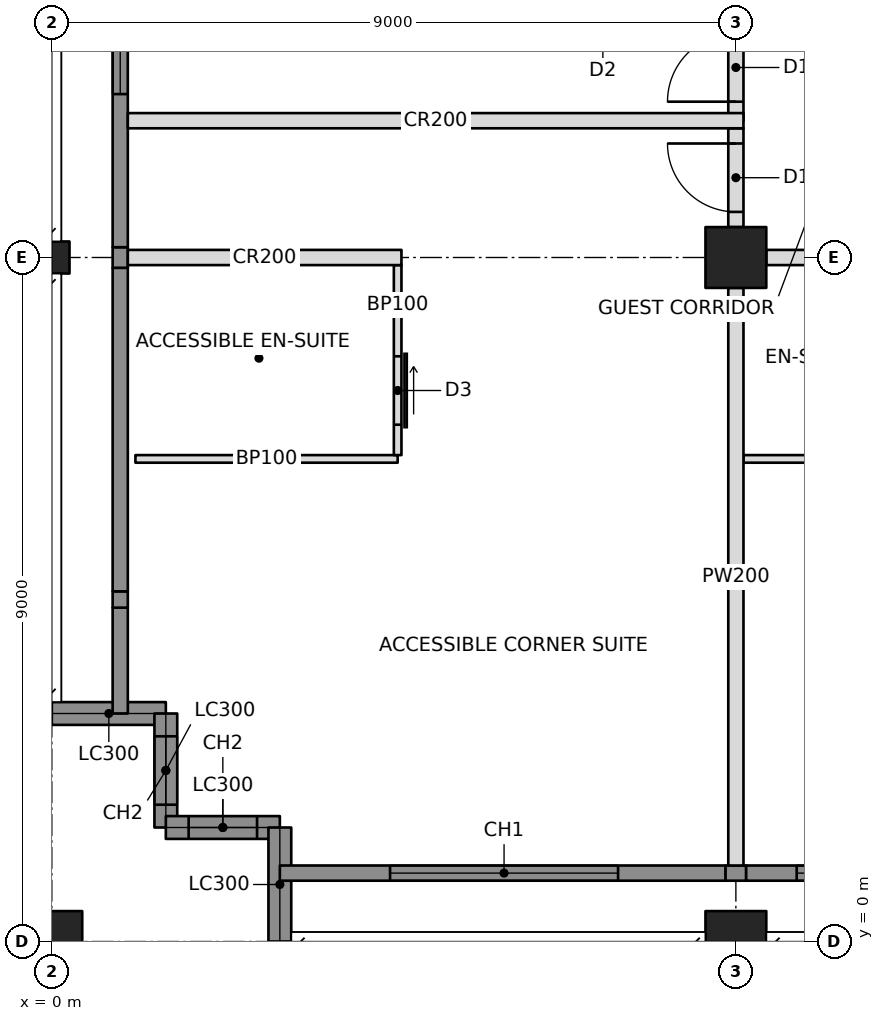
"""IFC4 building model, lengths in metres.
Left out: names, types, materials, properties, quantities, classifications, styles, units other than length and angle.
Written with IfcOpenShell. Run it as: python <this file> out.ifc"""

import sys

from ifc_helpers import new_model, si_unit, direction, frame, frame_2d, origin, origin_with_axes, origin_2d, place, context, subcontext, project, spatial, rectangle, hollow_rectangle, i_section, extrude, element, fill, save


model = new_model("IFC4")
c1 = context("Model", 3, precision=1e-05, world=origin(), true_north=direction((0.0, 1.0)))
c2 = subcontext(c1, "Body", "Model", "MODEL_VIEW")
j1 = project(units=[si_unit("LENGTHUNIT", "METRE"), si_unit("PLANEANGLEUNIT", "RADIAN")], contexts=[c1])
p1 = place(None, origin())
s1 = spatial("IfcSite", under=j1, at=p1, CompositionType="ELEMENT")
p2 = place(p1, origin())
s2 = spatial("IfcBuilding", under=s1, at=p2, CompositionType="ELEMENT")
p3 = place(p2, frame((0.0, 0.0, 230.2)))
s3 = spatial("IfcBuildingStorey", under=s2, at=p3, CompositionType="ELEMENT", Elevation=230.2)
p4 = place(p3, origin_with_axes())
e1 = element("IfcColumn", 1, at=p4, inside=s3, PredefinedType="COLUMN", context=c2, shape_type="SweptSolid", body=[
    extrude(hollow_rectangle(XDim=0.8, YDim=0.8, WallThickness=0.05, at=origin_2d()), origin(), (0.0, 0.0, 1.0), 3.6),
])
p5 = place(p3, frame((0.0, 9.0, 0.0), z_axis=(0.0, 0.0, 1.0), x_axis=(0.0, 1.0, 0.0)))
e2 = element("IfcColumn", 2, at=p5, inside=s3, PredefinedType="COLUMN", context=c2, shape_type="SweptSolid", body=[
    extrude(i_section(OverallWidth=0.422, OverallDepth=0.465, WebThickness=0.045, FlangeThickness=0.073, at=origin_2d()), origin(), (0.0, 0.0, 1.0), 3.6),
])
p6 = place(p3, frame((9.0, 0.0, 0.0), z_axis=(0.0, 0.0, 1.0), x_axis=(1.0, 0.0, 0.0)))
e3 = element("IfcColumn", 3, at=p6, inside=s3, PredefinedType="COLUMN", context=c2, shape_type="SweptSolid", body=[
    extrude(hollow_rectangle(XDim=0.8, YDim=0.8, WallThickness=0.05, at=origin_2d()), origin(), (0.0, 0.0, 1.0), 3.6),
])
p7 = place(p3, frame((9.0, 9.0, 0.0), z_axis=(0.0, 0.0, 1.0), x_axis=(1.0, 0.0, 0.0)))
e4 = element("IfcColumn", 4, at=p7, inside=s3, PredefinedType="COLUMN", context=c2, shape_type="SweptSolid", body=[
    extrude(hollow_rectangle(XDim=0.8, YDim=0.8, WallThickness=0.1, at=origin_2d()), origin(), (0.0, 0.0, 1.0), 3.6),
])
p8 = place(p3, frame((0.0, 3.0, 0.0), z_axis=(0.0, 0.0, 1.0), x_axis=(1.0, 0.0, 0.0)))
e5 = element("IfcWall", 5, at=p8, inside=s3, PredefinedType="SOLIDWALL", context=c2, shape_type="SweptSolid", body=[
    extrude(rectangle(XDim=1.5, YDim=0.3, at=frame_2d((0.75, 0.0))), origin(), (0.0, 0.0, 1.0), 2.62),
])
p9 = place(p3, frame((1.5, 3.0, 0.0), z_axis=(0.0, 0.0, 1.0), x_axis=(0.0, -1.0, 0.0)))
e6 = element("IfcWall", 6, at=p9, inside=s3, PredefinedType="SOLIDWALL", context=c2, shape_type="SweptSolid", body=[
    extrude(rectangle(XDim=1.5, YDim=0.3, at=frame_2d((0.75, 0.0))), origin(), (0.0, 0.0, 1.0), 3.4),
])
p10 = place(p9, frame((0.3, 0.0, 0.6)))
e7 = element("IfcOpeningElement", 7, at=p10, cuts=e6, PredefinedType="OPENING", context=c2, shape_type="SweptSolid", body=[
    extrude(rectangle(XDim=0.9, YDim=2.2, at=frame_2d((0.45, 1.1))), frame((0.0, 0.16, 0.0), z_axis=(0.0, -1.0, 0.0), x_axis=(1.0, 0.0, 0.0)), (0.0, 0.0, 1.0), 0.32),
])
p11 = place(p3, frame((1.5, 1.5, 0.0), z_axis=(0.0, 0.0, 1.0), x_axis=(1.0, 0.0, 0.0)))
e8 = element("IfcWall", 8, at=p11, inside=s3, PredefinedType="SOLIDWALL", context=c2, shape_type="SweptSolid", body=[
    extrude(rectangle(XDim=1.5, YDim=0.3, at=frame_2d((0.75, 0.0))), origin(), (0.0, 0.0, 1.0), 3.4),
])
p12 = place(p11, frame((0.3, 0.0, 0.6)))
e9 = element("IfcOpeningElement", 9, at=p12, cuts=e8, PredefinedType="OPENING", context=c2, shape_type="SweptSolid", body=[
    extrude(rectangle(XDim=0.9, YDim=2.2, at=frame_2d((0.45, 1.1))), frame((0.0, 0.16, 0.0), z_axis=(0.0, -1.0, 0.0), x_axis=(1.0, 0.0, 0.0)), (0.0, 0.0, 1.0), 0.32),
])
p13 = place(p3, frame((3.0, 1.5, 0.0), z_axis=(0.0, 0.0, 1.0), x_axis=(0.0, -1.0, 0.0)))
e10 = element("IfcWall", 10, at=p13, inside=s3, PredefinedType="SOLIDWALL", context=c2, shape_type="SweptSolid", body=[
    extrude(rectangle(XDim=1.5, YDim=0.3, at=frame_2d((0.75, 0.0))), origin(), (0.0, 0.0, 1.0), 2.62),
])
p14 = place(p3, frame((3.0, 0.9, 0.0), z_axis=(0.0, 0.0, 1.0), x_axis=(1.0, 0.0, 0.0)))
e11 = element("IfcWall", 11, at=p14, inside=s3, PredefinedType="SOLIDWALL", context=c2, shape_type="SweptSolid", body=[
    extrude(rectangle(XDim=5.865, YDim=0.2, at=frame_2d((2.932, 0.0))), origin(), (0.0, 0.0, 1.0), 3.4),
])
p15 = place(p14, frame((1.45, 0.0, 0.6)))
e12 = element("IfcOpeningElement", 12, at=p15, cuts=e11, PredefinedType="OPENING", context=c2, shape_type="SweptSolid", body=[
    extrude(rectangle(XDim=3.0, YDim=2.2, at=frame_2d((1.5, 1.1))), frame((0.0, 0.11, 0.0), z_axis=(0.0, -1.0, 0.0), x_axis=(1.0, 0.0, 0.0)), (0.0, 0.0, 1.0), 0.22),
])
p16 = place(p3, frame((0.9, 3.0, 0.0), z_axis=(0.0, 0.0, 1.0), x_axis=(0.0, 1.0, 0.0)))
e13 = element("IfcWall", 13, at=p16, inside=s3, PredefinedType="SOLIDWALL", context=c2, shape_type="SweptSolid", body=[
    extrude(rectangle(XDim=1.393, YDim=0.2, at=frame_2d((0.696, 0.0))), origin(), (0.0, 0.0, 1.0), 3.4),
])
p17 = place(p3, frame((1.0, 9.0, 0.0), z_axis=(0.0, 0.0, 1.0), x_axis=(1.0, 0.0, 0.0)))
e14 = element("IfcWall", 14, at=p17, inside=s3, PredefinedType="PARTITIONING", context=c2, shape_type="SweptSolid", body=[
    extrude(rectangle(XDim=3.6, YDim=0.2, at=frame_2d((1.8, 0.0))), origin(), (0.0, 0.0, 1.0), 2.638),
])
p18 = place(p3, frame((9.4, 9.0, 0.0), z_axis=(0.0, 0.0, 1.0), x_axis=(1.0, 0.0, 0.0)))
e15 = element("IfcWall", 15, at=p18, inside=s3, PredefinedType="PARTITIONING", context=c2, shape_type="SweptSolid", body=[
    extrude(rectangle(XDim=8.2, YDim=0.2, at=frame_2d((4.1, 0.0))), origin(), (0.0, 0.0, 1.0), 2.605),
])
p19 = place(p18, frame((2.95, 0.0, 0.0)))
e16 = element("IfcOpeningElement", 16, at=p19, cuts=e15, PredefinedType="OPENING", context=c2, shape_type="SweptSolid", body=[
    extrude(rectangle(XDim=0.9, YDim=2.1, at=frame_2d((0.45, 1.05))), frame((0.0, 0.11, 0.0), z_axis=(0.0, -1.0, 0.0), x_axis=(1.0, 0.0, 0.0)), (0.0, 0.0, 1.0), 0.22),
])
p20 = place(p18, frame((4.35, 0.0, 0.0)))
e17 = element("IfcOpeningElement", 17, at=p20, cuts=e15, PredefinedType="OPENING", context=c2, shape_type="SweptSolid", body=[
    extrude(rectangle(XDim=0.9, YDim=2.1, at=frame_2d((0.45, 1.05))), frame((0.0, 0.11, 0.0), z_axis=(0.0, -1.0, 0.0), x_axis=(1.0, 0.0, 0.0)), (0.0, 0.0, 1.0), 0.22),
])
p21 = place(p3, frame((9.0, 10.8, 0.0), z_axis=(0.0, 0.0, 1.0), x_axis=(0.0, 1.0, 0.0)))
e18 = element("IfcWall", 18, at=p21, inside=s3, PredefinedType="PARTITIONING", context=c2, shape_type="SweptSolid", body=[
    extrude(rectangle(XDim=6.8, YDim=0.2, at=frame_2d((3.4, 0.0))), origin(), (0.0, 0.0, 1.0), 2.605),
])
p22 = place(p21, frame((0.25, 0.0, 0.0)))
e19 = element("IfcOpeningElement", 19, at=p22, cuts=e18, PredefinedType="OPENING", context=c2, shape_type="SweptSolid", body=[
    extrude(rectangle(XDim=0.9, YDim=2.1, at=frame_2d((0.45, 1.05))), frame((0.0, 0.11, 0.0), z_axis=(0.0, -1.0, 0.0), x_axis=(1.0, 0.0, 0.0)), (0.0, 0.0, 1.0), 0.22),
])
p23 = place(p21, frame((3.85, 0.0, 0.0)))
e20 = element("IfcOpeningElement", 20, at=p23, cuts=e18, PredefinedType="OPENING", context=c2, shape_type="SweptSolid", body=[
    extrude(rectangle(XDim=0.9, YDim=2.1, at=frame_2d((0.45, 1.05))), frame((0.0, 0.11, 0.0), z_axis=(0.0, -1.0, 0.0), x_axis=(1.0, 0.0, 0.0)), (0.0, 0.0, 1.0), 0.22),
])
p24 = place(p3, frame((1.0, 10.8, 0.0), z_axis=(0.0, 0.0, 1.0), x_axis=(1.0, 0.0, 0.0)))
e21 = element("IfcWall", 21, at=p24, inside=s3, PredefinedType="PARTITIONING", context=c2, shape_type="SweptSolid", body=[
    extrude(rectangle(XDim=8.1, YDim=0.2, at=frame_2d((4.05, 0.0))), origin(), (0.0, 0.0, 1.0), 2.604),
])
p25 = place(p3, frame((9.0, 8.6, 0.0), z_axis=(0.0, 0.0, 1.0), x_axis=(0.0, -1.0, 0.0)))
e22 = element("IfcWall", 22, at=p25, inside=s3, PredefinedType="PARTITIONING", context=c2, shape_type="SweptSolid", body=[
    extrude(rectangle(XDim=7.6, YDim=0.2, at=frame_2d((3.8, 0.0))), origin(), (0.0, 0.0, 1.0), 2.638),
])
p26 = place(p3, frame((1.1, 6.35, 0.0), z_axis=(0.0, 0.0, 1.0), x_axis=(1.0, 0.0, 0.0)))
e23 = element("IfcWall", 23, at=p26, inside=s3, PredefinedType="PARTITIONING", context=c2, shape_type="SweptSolid", body=[
    extrude(rectangle(XDim=3.45, YDim=0.1, at=frame_2d((1.725, 0.0))), origin(), (0.0, 0.0, 1.0), 3.4),
])
p27 = place(p3, frame((4.55, 8.9, 0.0), z_axis=(0.0, 0.0, 1.0), x_axis=(0.0, -1.0, 0.0)))
e24 = element("IfcWall", 24, at=p27, inside=s3, PredefinedType="PARTITIONING", context=c2, shape_type="SweptSolid", body=[
    extrude(rectangle(XDim=2.5, YDim=0.1, at=frame_2d((1.25, 0.0))), origin(), (0.0, 0.0, 1.0), 2.638),
])
p28 = place(p27, frame((1.2, 0.0, 0.0)))
e25 = element("IfcOpeningElement", 25, at=p28, cuts=e24, PredefinedType="OPENING", context=c2, shape_type="SweptSolid", body=[
    extrude(rectangle(XDim=0.9, YDim=2.1, at=frame_2d((0.45, 1.05))), frame((0.0, 0.06, 0.0), z_axis=(0.0, -1.0, 0.0), x_axis=(1.0, 0.0, 0.0)), (0.0, 0.0, 1.0), 0.12),
])
p29 = place(p3, frame((9.1, 6.35, 0.0), z_axis=(0.0, 0.0, 1.0), x_axis=(1.0, 0.0, 0.0)))
e26 = element("IfcWall", 26, at=p29, inside=s3, PredefinedType="PARTITIONING", context=c2, shape_type="SweptSolid", body=[
    extrude(rectangle(XDim=2.95, YDim=0.1, at=frame_2d((1.475, 0.0))), origin(), (0.0, 0.0, 1.0), 2.638),
])
p30 = place(p3, frame((9.0, 9.4, 0.0), z_axis=(0.0, 0.0, 1.0), x_axis=(0.0, 1.0, 0.0)))
e27 = element("IfcWall", 27, at=p30, inside=s3, PredefinedType="PARTITIONING", context=c2, shape_type="SweptSolid", body=[
    extrude(rectangle(XDim=1.3, YDim=0.2, at=frame_2d((0.65, 0.0))), origin(), (0.0, 0.0, 1.0), 2.605),
])
p31 = place(p30, frame((0.2, 0.0, 0.0)))
e28 = element("IfcOpeningElement", 28, at=p31, cuts=e27, PredefinedType="OPENING", context=c2, shape_type="SweptSolid", body=[
    extrude(rectangle(XDim=0.9, YDim=2.1, at=frame_2d((0.45, 1.05))), frame((0.0, 0.11, 0.0), z_axis=(0.0, -1.0, 0.0), x_axis=(1.0, 0.0, 0.0)), (0.0, 0.0, 1.0), 0.22),
])
p32 = place(p3, frame((8.865, 0.9, 0.0), z_axis=(0.0, 0.0, 1.0), x_axis=(1.0, 0.0, 0.0)))
e29 = element("IfcWall", 29, at=p32, inside=s3, PredefinedType="SOLIDWALL", context=c2, shape_type="SweptSolid", body=[
    extrude(rectangle(XDim=0.271, YDim=0.2, at=frame_2d((0.135, 0.0))), origin(), (0.0, 0.0, 1.0), 2.638),
])
p33 = place(p3, frame((9.135, 0.9, 0.0), z_axis=(0.0, 0.0, 1.0), x_axis=(1.0, 0.0, 0.0)))
e30 = element("IfcWall", 30, at=p33, inside=s3, PredefinedType="SOLIDWALL", context=c2, shape_type="SweptSolid", body=[
    extrude(rectangle(XDim=8.671, YDim=0.2, at=frame_2d((4.335, 0.0))), origin(), (0.0, 0.0, 1.0), 3.4),
])
p34 = place(p33, frame((0.665, 0.0, 0.6)))
e31 = element("IfcOpeningElement", 31, at=p34, cuts=e30, PredefinedType="OPENING", context=c2, shape_type="SweptSolid", body=[
    extrude(rectangle(XDim=3.0, YDim=2.2, at=frame_2d((1.5, 1.1))), frame((0.0, 0.11, 0.0), z_axis=(0.0, -1.0, 0.0), x_axis=(1.0, 0.0, 0.0)), (0.0, 0.0, 1.0), 0.22),
])
p35 = place(p33, frame((5.065, 0.0, 0.6)))
e32 = element("IfcOpeningElement", 32, at=p35, cuts=e30, PredefinedType="OPENING", context=c2, shape_type="SweptSolid", body=[
    extrude(rectangle(XDim=3.0, YDim=2.2, at=frame_2d((1.5, 1.1))), frame((0.0, 0.11, 0.0), z_axis=(0.0, -1.0, 0.0), x_axis=(1.0, 0.0, 0.0)), (0.0, 0.0, 1.0), 0.22),
])
p36 = place(p3, frame((0.9, 4.393, 0.0), z_axis=(0.0, 0.0, 1.0), x_axis=(0.0, 1.0, 0.0)))
e33 = element("IfcWall", 33, at=p36, inside=s3, PredefinedType="SOLIDWALL", context=c2, shape_type="SweptSolid", body=[
    extrude(rectangle(XDim=0.215, YDim=0.2, at=frame_2d((0.107, 0.0))), origin(), (0.0, 0.0, 1.0), 2.861),
])
p37 = place(p3, frame((0.9, 4.607, 0.0), z_axis=(0.0, 0.0, 1.0), x_axis=(0.0, 1.0, 0.0)))
e34 = element("IfcWall", 34, at=p37, inside=s3, PredefinedType="SOLIDWALL", context=c2, shape_type="SweptSolid", body=[
    extrude(rectangle(XDim=4.257, YDim=0.2, at=frame_2d((2.129, 0.0))), origin(), (0.0, 0.0, 1.0), 3.4),
])
p38 = place(p3, frame((0.9, 8.865, 0.0), z_axis=(0.0, 0.0, 1.0), x_axis=(0.0, 1.0, 0.0)))
e35 = element("IfcWall", 35, at=p38, inside=s3, PredefinedType="SOLIDWALL", context=c2, shape_type="SweptSolid", body=[
    extrude(rectangle(XDim=0.271, YDim=0.2, at=frame_2d((0.135, 0.0))), origin(), (0.0, 0.0, 1.0), 2.638),
])
p39 = place(p3, frame((0.9, 9.135, 0.0), z_axis=(0.0, 0.0, 1.0), x_axis=(0.0, 1.0, 0.0)))
e36 = element("IfcWall", 36, at=p39, inside=s3, PredefinedType="SOLIDWALL", context=c2, shape_type="SweptSolid", body=[
    extrude(rectangle(XDim=8.671, YDim=0.2, at=frame_2d((4.335, 0.0))), origin(), (0.0, 0.0, 1.0), 3.4),
])
p40 = place(p39, frame((2.015, 0.0, 0.6)))
e37 = element("IfcOpeningElement", 37, at=p40, cuts=e36, PredefinedType="OPENING", context=c2, shape_type="SweptSolid", body=[
    extrude(rectangle(XDim=3.0, YDim=2.2, at=frame_2d((1.5, 1.1))), frame((0.0, 0.11, 0.0), z_axis=(0.0, -1.0, 0.0), x_axis=(1.0, 0.0, 0.0)), (0.0, 0.0, 1.0), 0.22),
])
p41 = place(p39, frame((5.515, 0.0, 0.6)))
e38 = element("IfcOpeningElement", 38, at=p41, cuts=e36, PredefinedType="OPENING", context=c2, shape_type="SweptSolid", body=[
    extrude(rectangle(XDim=3.0, YDim=2.2, at=frame_2d((1.5, 1.1))), frame((0.0, 0.11, 0.0), z_axis=(0.0, -1.0, 0.0), x_axis=(1.0, 0.0, 0.0)), (0.0, 0.0, 1.0), 0.22),
])
p42 = place(p10, origin())
e39 = element("IfcWindow", 39, at=p42, inside=s3, PartitioningType="SINGLE_PANEL", PredefinedType="WINDOW", context=c2, shape_type="SweptSolid", body=[
    extrude(rectangle(XDim=0.9, YDim=2.2, at=frame_2d((0.45, 1.1))), frame((0.0, 0.03, 0.0), z_axis=(0.0, -1.0, 0.0), x_axis=(1.0, 0.0, 0.0)), (0.0, 0.0, 1.0), 0.06),
])
fill(e7, e39)
p43 = place(p12, origin())
e40 = element("IfcWindow", 40, at=p43, inside=s3, PartitioningType="SINGLE_PANEL", PredefinedType="WINDOW", context=c2, shape_type="SweptSolid", body=[
    extrude(rectangle(XDim=0.9, YDim=2.2, at=frame_2d((0.45, 1.1))), frame((0.0, 0.03, 0.0), z_axis=(0.0, -1.0, 0.0), x_axis=(1.0, 0.0, 0.0)), (0.0, 0.0, 1.0), 0.06),
])
fill(e9, e40)
p44 = place(p15, origin())
e41 = element("IfcWindow", 41, at=p44, inside=s3, PartitioningType="TRIPLE_PANEL_VERTICAL", PredefinedType="WINDOW", context=c2, shape_type="SweptSolid", body=[
    extrude(rectangle(XDim=3.0, YDim=2.2, at=frame_2d((1.5, 1.1))), frame((0.0, 0.03, 0.0), z_axis=(0.0, -1.0, 0.0), x_axis=(1.0, 0.0, 0.0)), (0.0, 0.0, 1.0), 0.06),
])
fill(e12, e41)
p45 = place(p34, origin())
e42 = element("IfcWindow", 42, at=p45, inside=s3, PartitioningType="TRIPLE_PANEL_VERTICAL", PredefinedType="WINDOW", context=c2, shape_type="SweptSolid", body=[
    extrude(rectangle(XDim=3.0, YDim=2.2, at=frame_2d((1.5, 1.1))), frame((0.0, 0.03, 0.0), z_axis=(0.0, -1.0, 0.0), x_axis=(1.0, 0.0, 0.0)), (0.0, 0.0, 1.0), 0.06),
])
fill(e31, e42)
p46 = place(p40, origin())
e43 = element("IfcWindow", 43, at=p46, inside=s3, PartitioningType="TRIPLE_PANEL_VERTICAL", PredefinedType="WINDOW", context=c2, shape_type="SweptSolid", body=[
    extrude(rectangle(XDim=3.0, YDim=2.2, at=frame_2d((1.5, 1.1))), frame((0.0, 0.03, 0.0), z_axis=(0.0, -1.0, 0.0), x_axis=(1.0, 0.0, 0.0)), (0.0, 0.0, 1.0), 0.06),
])
fill(e37, e43)
p47 = place(p28, origin())
e44 = element("IfcDoor", 44, at=p47, inside=s3, OperationType="SLIDING_TO_LEFT", PredefinedType="DOOR", context=c2, shape_type="SweptSolid", body=[
    extrude(rectangle(XDim=0.9, YDim=2.1, at=frame_2d((0.45, 1.05))), frame((0.0, 0.025, 0.0), z_axis=(0.0, -1.0, 0.0), x_axis=(1.0, 0.0, 0.0)), (0.0, 0.0, 1.0), 0.05),
])
fill(e25, e44)
p48 = place(p22, origin())
e45 = element("IfcDoor", 45, at=p48, inside=s3, OperationType="SINGLE_SWING_LEFT", PredefinedType="DOOR", context=c2, shape_type="SweptSolid", body=[
    extrude(rectangle(XDim=0.9, YDim=2.1, at=frame_2d((0.45, 1.05))), frame((0.0, 0.025, 0.0), z_axis=(0.0, -1.0, 0.0), x_axis=(1.0, 0.0, 0.0)), (0.0, 0.0, 1.0), 0.05),
])
fill(e19, e45)
p49 = place(p31, origin())
e46 = element("IfcDoor", 46, at=p49, inside=s3, OperationType="SINGLE_SWING_RIGHT", PredefinedType="DOOR", context=c2, shape_type="SweptSolid", body=[
    extrude(rectangle(XDim=0.9, YDim=2.1, at=frame_2d((0.45, 1.05))), frame((0.0, 0.025, 0.0), z_axis=(0.0, -1.0, 0.0), x_axis=(1.0, 0.0, 0.0)), (0.0, 0.0, 1.0), 0.05),
])
fill(e28, e46)
save(model, sys.argv[1])
